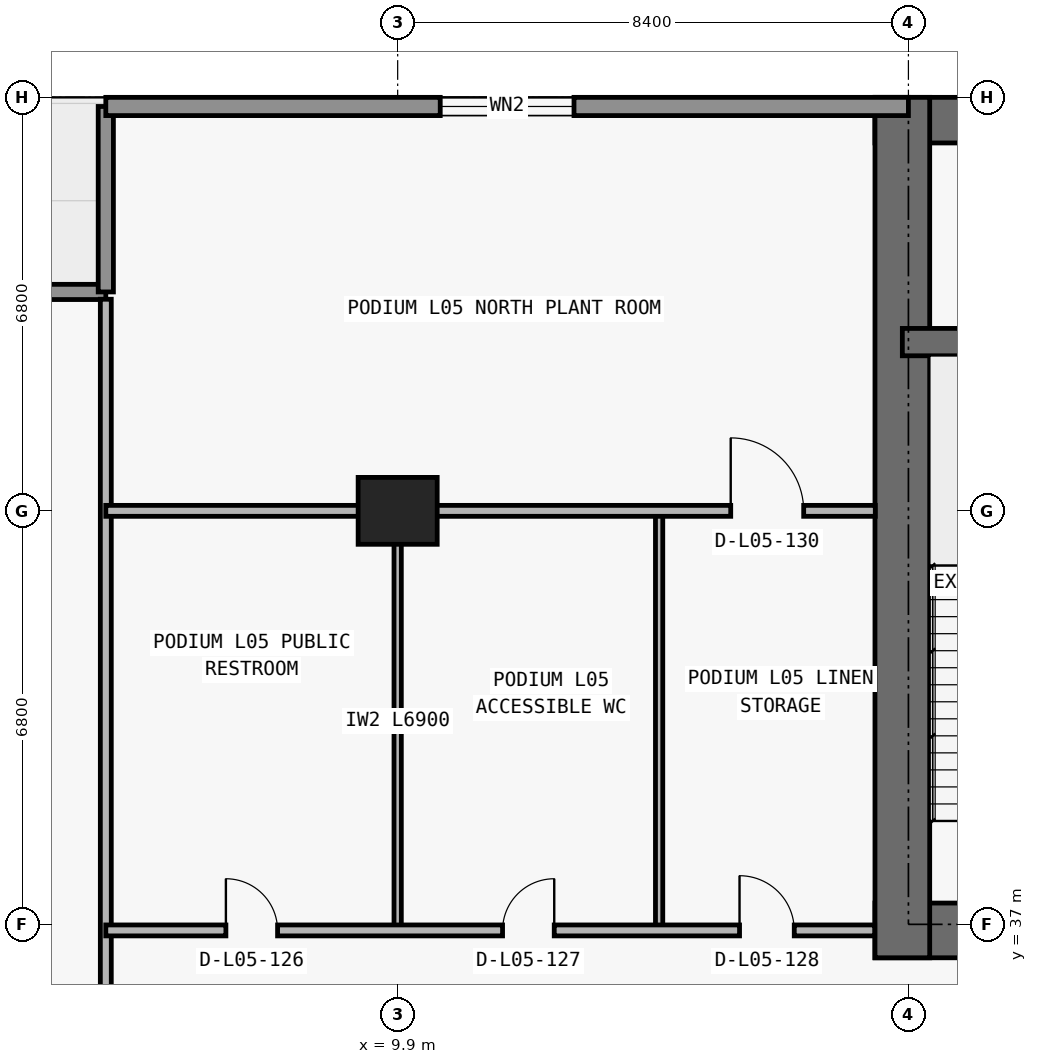
"""IFC4 building model, lengths in metres.
Left out: names, types, materials, properties, quantities, classifications, styles, units other than length and angle.
Written with IfcOpenShell. Run it as: python <this file> out.ifc"""

import sys

from ifc_helpers import new_model, si_unit, direction, frame, frame_2d, origin, origin_2d, place, context, subcontext, project, spatial, rectangle, extrude, element, fill, save


model = new_model("IFC4")
c1 = context("Model", 3, precision=1e-05, world=origin(), true_north=direction((0.0, 1.0)))
c2 = subcontext(c1, "Body", "Model", "MODEL_VIEW")
j1 = project(units=[si_unit("LENGTHUNIT", "METRE"), si_unit("PLANEANGLEUNIT", "RADIAN")], contexts=[c1])
p1 = place(None, origin())
s1 = spatial("IfcSite", under=j1, at=p1, CompositionType="ELEMENT")
p2 = place(p1, origin())
s2 = spatial("IfcBuilding", under=s1, at=p2, CompositionType="ELEMENT")
p3 = place(p2, frame((0.0, 0.0, 24.6)))
s3 = spatial("IfcBuildingStorey", under=s2, at=p3, CompositionType="ELEMENT", Elevation=24.6)
p4 = place(p3, frame((9.9, 43.8, 0.0), z_axis=(0.0, 0.0, 1.0), x_axis=(1.0, 0.0, 0.0)))
e1 = element("IfcColumn", 1, at=p4, inside=s3, PredefinedType="COLUMN", context=c2, shape_type="SweptSolid", body=[
    extrude(rectangle(XDim=1.3, YDim=1.1, at=origin_2d()), origin(), (0.0, 0.0, 1.0), 5.15),
])
p5 = place(p3, frame((17.75, 36.9, 0.0), z_axis=(0.0, 0.0, 1.0), x_axis=(1.0, 0.0, 0.0)))
e2 = element("IfcWall", 2, at=p5, inside=s3, PredefinedType="SHEAR", context=c2, shape_type="SweptSolid", body=[
    extrude(rectangle(XDim=42.3, YDim=0.9, at=frame_2d((21.15, 0.0))), origin(), (0.0, 0.0, 1.0), 5.15),
])
p6 = place(p5, frame((14.55, 0.0, 0.0)))
e3 = element("IfcOpeningElement", 3, at=p6, cuts=e2, PredefinedType="OPENING", context=c2, shape_type="SweptSolid", body=[
    extrude(rectangle(XDim=1.1, YDim=2.15, at=frame_2d((0.55, 1.075))), frame((0.0, 0.46, 0.0), z_axis=(0.0, -1.0, 0.0), x_axis=(1.0, 0.0, 0.0)), (0.0, 0.0, 1.0), 0.92),
])
p7 = place(p5, frame((6.4, 0.0, 0.0)))
e4 = element("IfcOpeningElement", 4, at=p7, cuts=e2, PredefinedType="OPENING", context=c2, shape_type="SweptSolid", body=[
    extrude(rectangle(XDim=1.05, YDim=2.15, at=frame_2d((0.525, 1.075))), frame((0.0, 0.46, 0.0), z_axis=(0.0, -1.0, 0.0), x_axis=(1.0, 0.0, 0.0)), (0.0, 0.0, 1.0), 0.92),
])
p8 = place(p5, frame((34.9, 0.0, 0.0)))
e5 = element("IfcOpeningElement", 5, at=p8, cuts=e2, PredefinedType="OPENING", context=c2, shape_type="SweptSolid", body=[
    extrude(rectangle(XDim=1.05, YDim=2.15, at=frame_2d((0.525, 1.075))), frame((0.0, 0.46, 0.0), z_axis=(0.0, -1.0, 0.0), x_axis=(1.0, 0.0, 0.0)), (0.0, 0.0, 1.0), 0.92),
])
p9 = place(p5, frame((11.012, 0.0, 0.0)))
e6 = element("IfcOpeningElement", 6, at=p9, cuts=e2, PredefinedType="OPENING", context=c2, shape_type="SweptSolid", body=[
    extrude(rectangle(XDim=1.05, YDim=2.15, at=frame_2d((0.525, 1.075))), frame((0.0, 0.46, 0.0), z_axis=(0.0, -1.0, 0.0), x_axis=(1.0, 0.0, 0.0)), (0.0, 0.0, 1.0), 0.92),
])
p10 = place(p5, frame((24.25, 0.0, 0.0)))
e7 = element("IfcOpeningElement", 7, at=p10, cuts=e2, PredefinedType="OPENING", context=c2, shape_type="SweptSolid", body=[
    extrude(rectangle(XDim=1.05, YDim=2.15, at=frame_2d((0.525, 1.075))), frame((0.0, 0.46, 0.0), z_axis=(0.0, -1.0, 0.0), x_axis=(1.0, 0.0, 0.0)), (0.0, 0.0, 1.0), 0.92),
])
p11 = place(p3, frame((17.75, 50.225, 0.0), z_axis=(0.0, 0.0, 1.0), x_axis=(1.0, 0.0, 0.0)))
e8 = element("IfcWall", 8, at=p11, inside=s3, PredefinedType="SHEAR", context=c2, shape_type="SweptSolid", body=[
    extrude(rectangle(XDim=42.3, YDim=0.75, at=frame_2d((21.15, 0.0))), origin(), (0.0, 0.0, 1.0), 5.15),
])
p12 = place(p3, frame((18.2, 36.45, 0.0), z_axis=(0.0, 0.0, 1.0), x_axis=(0.0, 1.0, 0.0)))
e9 = element("IfcWall", 9, at=p12, inside=s3, PredefinedType="SHEAR", context=c2, shape_type="SweptSolid", body=[
    extrude(rectangle(XDim=14.15, YDim=0.9, at=frame_2d((7.075, 0.0))), origin(), (0.0, 0.0, 1.0), 5.15),
])
p13 = place(p3, frame((18.2, 46.575, 0.0), z_axis=(0.0, 0.0, 1.0), x_axis=(1.0, 0.0, 0.0)))
e10 = element("IfcWall", 10, at=p13, inside=s3, PredefinedType="SHEAR", context=c2, shape_type="SweptSolid", body=[
    extrude(rectangle(XDim=41.4, YDim=0.45, at=frame_2d((20.7, 0.0))), origin(), (0.0, 0.0, 1.0), 5.15),
])
p14 = place(p13, frame((7.675, 0.0, 0.0)))
e11 = element("IfcOpeningElement", 11, at=p14, cuts=e10, PredefinedType="OPENING", context=c2, shape_type="SweptSolid", body=[
    extrude(rectangle(XDim=1.05, YDim=2.15, at=frame_2d((0.525, 1.075))), frame((0.0, 0.235, 0.0), z_axis=(0.0, -1.0, 0.0), x_axis=(1.0, 0.0, 0.0)), (0.0, 0.0, 1.0), 0.47),
])
p15 = place(p13, frame((32.725, 0.0, 0.0)))
e12 = element("IfcOpeningElement", 12, at=p15, cuts=e10, PredefinedType="OPENING", context=c2, shape_type="SweptSolid", body=[
    extrude(rectangle(XDim=1.05, YDim=2.15, at=frame_2d((0.525, 1.075))), frame((0.0, 0.235, 0.0), z_axis=(0.0, -1.0, 0.0), x_axis=(1.0, 0.0, 0.0)), (0.0, 0.0, 1.0), 0.47),
])
p16 = place(p3, frame((1.65, 47.4, 0.0), z_axis=(0.0, 0.0, 1.0), x_axis=(1.0, 0.0, 0.0)))
e13 = element("IfcWall", 13, at=p16, inside=s3, PredefinedType="ELEMENTEDWALL", context=c2, shape_type="SweptSolid", body=[
    extrude(rectangle(XDim=3.45, YDim=0.25, at=frame_2d((1.725, 0.0))), origin(), (0.0, 0.0, 1.0), 5.15),
])
p17 = place(p3, frame((5.1, 47.4, 0.0), z_axis=(0.0, 0.0, 1.0), x_axis=(0.0, 1.0, 0.0)))
e14 = element("IfcWall", 14, at=p17, inside=s3, PredefinedType="ELEMENTEDWALL", context=c2, shape_type="SweptSolid", body=[
    extrude(rectangle(XDim=3.05, YDim=0.25, at=frame_2d((1.525, 0.0))), origin(), (0.0, 0.0, 1.0), 5.15),
])
p18 = place(p3, frame((5.1, 50.45, 0.0), z_axis=(0.0, 0.0, 1.0), x_axis=(1.0, 0.0, 0.0)))
e15 = element("IfcWall", 15, at=p18, inside=s3, PredefinedType="STANDARD", context=c2, shape_type="SweptSolid", body=[
    extrude(rectangle(XDim=13.2, YDim=0.3, at=frame_2d((6.6, 0.0))), origin(), (0.0, 0.0, 1.0), 5.15),
])
p19 = place(p18, frame((5.5, 0.0, 0.85)))
e16 = element("IfcOpeningElement", 16, at=p19, cuts=e15, PredefinedType="OPENING", context=c2, shape_type="SweptSolid", body=[
    extrude(rectangle(XDim=2.2, YDim=1.55, at=frame_2d((1.1, 0.775))), frame((0.0, 0.16, 0.0), z_axis=(0.0, -1.0, 0.0), x_axis=(1.0, 0.0, 0.0)), (0.0, 0.0, 1.0), 0.32),
])
p20 = place(p3, frame((5.1, 6.285, 0.0), z_axis=(0.0, 0.0, 1.0), x_axis=(0.0, 1.0, 0.0)))
e17 = element("IfcWall", 17, at=p20, inside=s3, PredefinedType="PARTITIONING", context=c2, shape_type="SweptSolid", body=[
    extrude(rectangle(XDim=40.995, YDim=0.18, at=frame_2d((20.498, 0.0))), origin(), (0.0, 0.0, 1.0), 5.15),
])
p21 = place(p3, frame((9.9, 36.9, 0.0), z_axis=(0.0, 0.0, 1.0), x_axis=(0.0, 1.0, 0.0)))
e18 = element("IfcWall", 18, at=p21, inside=s3, PredefinedType="PARTITIONING", context=c2, shape_type="SweptSolid", body=[
    extrude(rectangle(XDim=6.9, YDim=0.12, at=frame_2d((3.45, 0.0))), origin(), (0.0, 0.0, 1.0), 3.635),
])
p22 = place(p3, frame((14.2, 36.9, 0.0), z_axis=(0.0, 0.0, 1.0), x_axis=(0.0, 1.0, 0.0)))
e19 = element("IfcWall", 19, at=p22, inside=s3, PredefinedType="PARTITIONING", context=c2, shape_type="SweptSolid", body=[
    extrude(rectangle(XDim=6.9, YDim=0.12, at=frame_2d((3.45, 0.0))), origin(), (0.0, 0.0, 1.0), 5.15),
])
p23 = place(p3, frame((5.1, 36.9, 0.0), z_axis=(0.0, 0.0, 1.0), x_axis=(1.0, 0.0, 0.0)))
e20 = element("IfcWall", 20, at=p23, inside=s3, PredefinedType="PARTITIONING", context=c2, shape_type="SweptSolid", body=[
    extrude(rectangle(XDim=12.645, YDim=0.18, at=frame_2d((6.323, 0.0))), origin(), (0.0, 0.0, 1.0), 5.15),
])
p24 = place(p23, frame((1.975, 0.0, 0.0)))
e21 = element("IfcOpeningElement", 21, at=p24, cuts=e20, PredefinedType="OPENING", context=c2, shape_type="SweptSolid", body=[
    extrude(rectangle(XDim=0.85, YDim=2.1, at=frame_2d((0.425, 1.05))), frame((0.0, 0.1, 0.0), z_axis=(0.0, -1.0, 0.0), x_axis=(1.0, 0.0, 0.0)), (0.0, 0.0, 1.0), 0.2),
])
p25 = place(p23, frame((6.525, 0.0, 0.0)))
e22 = element("IfcOpeningElement", 22, at=p25, cuts=e20, PredefinedType="OPENING", context=c2, shape_type="SweptSolid", body=[
    extrude(rectangle(XDim=0.85, YDim=2.1, at=frame_2d((0.425, 1.05))), frame((0.0, 0.1, 0.0), z_axis=(0.0, -1.0, 0.0), x_axis=(1.0, 0.0, 0.0)), (0.0, 0.0, 1.0), 0.2),
])
p26 = place(p23, frame((10.423, 0.0, 0.0)))
e23 = element("IfcOpeningElement", 23, at=p26, cuts=e20, PredefinedType="OPENING", context=c2, shape_type="SweptSolid", body=[
    extrude(rectangle(XDim=0.9, YDim=2.15, at=frame_2d((0.45, 1.075))), frame((0.0, 0.1, 0.0), z_axis=(0.0, -1.0, 0.0), x_axis=(1.0, 0.0, 0.0)), (0.0, 0.0, 1.0), 0.2),
])
p27 = place(p3, frame((5.1, 43.8, 0.0), z_axis=(0.0, 0.0, 1.0), x_axis=(1.0, 0.0, 0.0)))
e24 = element("IfcWall", 24, at=p27, inside=s3, PredefinedType="PARTITIONING", context=c2, shape_type="SweptSolid", body=[
    extrude(rectangle(XDim=12.655, YDim=0.18, at=frame_2d((6.327, 0.0))), origin(), (0.0, 0.0, 1.0), 4.439),
])
p28 = place(p27, frame((10.278, 0.0, 0.0)))
e25 = element("IfcOpeningElement", 25, at=p28, cuts=e24, PredefinedType="OPENING", context=c2, shape_type="SweptSolid", body=[
    extrude(rectangle(XDim=1.2, YDim=2.2, at=frame_2d((0.6, 1.1))), frame((0.0, 0.1, 0.0), z_axis=(0.0, -1.0, 0.0), x_axis=(1.0, 0.0, 0.0)), (0.0, 0.0, 1.0), 0.2),
])
p29 = place(p19, origin())
e26 = element("IfcWindow", 26, at=p29, inside=s3, PartitioningType="SINGLE_PANEL", PredefinedType="WINDOW", context=c2, shape_type="SweptSolid", body=[
    extrude(rectangle(XDim=2.2, YDim=1.55, at=frame_2d((1.1, 0.775))), frame((0.0, 0.03, 0.0), z_axis=(0.0, -1.0, 0.0), x_axis=(1.0, 0.0, 0.0)), (0.0, 0.0, 1.0), 0.06),
])
fill(e16, e26)
p30 = place(p24, origin())
e27 = element("IfcDoor", 27, at=p30, inside=s3, OperationType="SINGLE_SWING_LEFT", PredefinedType="DOOR", context=c2, shape_type="SweptSolid", body=[
    extrude(rectangle(XDim=0.85, YDim=2.1, at=frame_2d((0.425, 1.05))), frame((0.0, 0.025, 0.0), z_axis=(0.0, -1.0, 0.0), x_axis=(1.0, 0.0, 0.0)), (0.0, 0.0, 1.0), 0.05),
])
fill(e21, e27)
p31 = place(p25, origin())
e28 = element("IfcDoor", 28, at=p31, inside=s3, OperationType="SINGLE_SWING_RIGHT", PredefinedType="DOOR", context=c2, shape_type="SweptSolid", body=[
    extrude(rectangle(XDim=0.85, YDim=2.1, at=frame_2d((0.425, 1.05))), frame((0.0, 0.025, 0.0), z_axis=(0.0, -1.0, 0.0), x_axis=(1.0, 0.0, 0.0)), (0.0, 0.0, 1.0), 0.05),
])
fill(e22, e28)
p32 = place(p26, origin())
e29 = element("IfcDoor", 29, at=p32, inside=s3, OperationType="SINGLE_SWING_LEFT", PredefinedType="DOOR", context=c2, shape_type="SweptSolid", body=[
    extrude(rectangle(XDim=0.9, YDim=2.15, at=frame_2d((0.45, 1.075))), frame((0.0, 0.025, 0.0), z_axis=(0.0, -1.0, 0.0), x_axis=(1.0, 0.0, 0.0)), (0.0, 0.0, 1.0), 0.05),
])
fill(e23, e29)
p33 = place(p28, origin())
e30 = element("IfcDoor", 30, at=p33, inside=s3, OperationType="SINGLE_SWING_LEFT", PredefinedType="DOOR", context=c2, shape_type="SweptSolid", body=[
    extrude(rectangle(XDim=1.2, YDim=2.2, at=frame_2d((0.6, 1.1))), frame((0.0, 0.025, 0.0), z_axis=(0.0, -1.0, 0.0), x_axis=(1.0, 0.0, 0.0)), (0.0, 0.0, 1.0), 0.05),
])
fill(e25, e30)
save(model, sys.argv[1])
